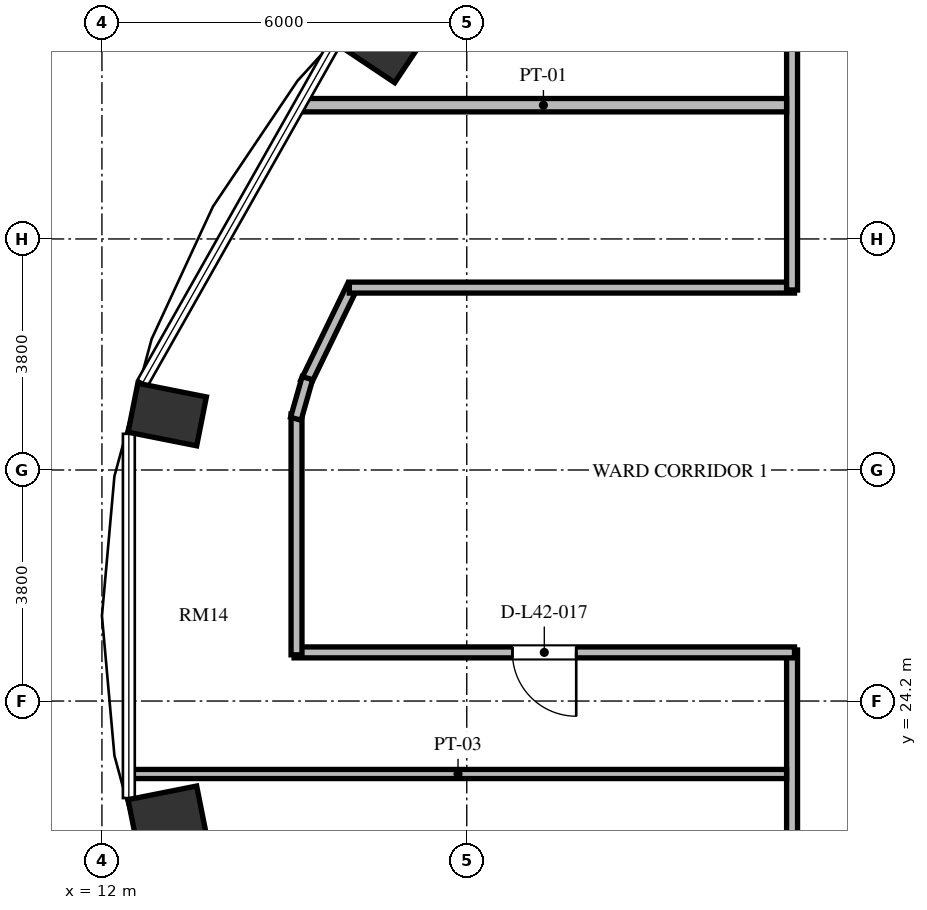
"""IFC4 building model, lengths in metres.
Left out: names, types, materials, properties, quantities, classifications, styles, units other than length and angle.
Written with IfcOpenShell. Run it as: python <this file> out.ifc"""

import sys

from ifc_helpers import new_model, si_unit, direction, frame, frame_2d, origin, origin_2d, place, context, subcontext, project, spatial, rectangle, extrude, element, fill, save


model = new_model("IFC4")
c1 = context("Model", 3, precision=1e-05, world=origin(), true_north=direction((0.0, 1.0)))
c2 = subcontext(c1, "Body", "Model", "MODEL_VIEW")
j1 = project(units=[si_unit("LENGTHUNIT", "METRE"), si_unit("PLANEANGLEUNIT", "RADIAN")], contexts=[c1])
p1 = place(None, origin())
s1 = spatial("IfcSite", under=j1, at=p1, CompositionType="ELEMENT")
p2 = place(p1, origin())
s2 = spatial("IfcBuilding", under=s1, at=p2, CompositionType="ELEMENT")
p3 = place(p2, frame((0.0, 0.0, 163.824)))
s3 = spatial("IfcBuildingStorey", under=s2, at=p3, CompositionType="ELEMENT", Elevation=163.824)
for number, where, z_axis, x_axis in (
    (1, (16.564, 35.031, 0.0), (0.0, 0.0, 1.0), (-0.831, 0.556, 0.0)),
    (2, (13.074, 28.912, 0.0), (0.0, 0.0, 1.0), (-0.981, 0.195, 0.0)),
    (3, (13.074, 22.288, 0.0), (0.0, 0.0, 1.0), (-0.981, -0.195, 0.0)),
):
    element("IfcColumn", number, at=place(p3, frame(where, z_axis=z_axis, x_axis=x_axis)), inside=s3, PredefinedType="COLUMN", context=c2, shape_type="SweptSolid", body=[
        extrude(rectangle(XDim=1.15, YDim=0.82, at=origin_2d()), origin(), (0.0, 0.0, 1.0), 3.648),
    ])
p4 = place(p3, frame((15.35, 29.436, 0.0), z_axis=(0.0, 0.0, 1.0), x_axis=(0.436196025907, 0.899851669434, 0.0)))
e4 = element("IfcWall", 4, at=p4, inside=s3, PredefinedType="PARTITIONING", context=c2, shape_type="SweptSolid", body=[
    extrude(rectangle(XDim=1.778, YDim=0.18, at=frame_2d((0.889, 0.0))), origin(), (0.0, 0.0, 1.0), 3.428),
])
p5 = place(p3, frame((16.068, 31.0, 0.0), z_axis=(0.0, 0.0, 1.0), x_axis=(1.0, 0.0, 0.0)))
e5 = element("IfcWall", 5, at=p5, inside=s3, PredefinedType="PARTITIONING", context=c2, shape_type="SweptSolid", body=[
    extrude(rectangle(XDim=7.322, YDim=0.18, at=frame_2d((3.661, 0.0))), origin(), (0.0, 0.0, 1.0), 3.428),
])
p6 = place(p3, frame((23.35, 30.96, 0.0), z_axis=(0.0, 0.0, 1.0), x_axis=(0.0, 1.0, 0.0)))
e6 = element("IfcWall", 6, at=p6, inside=s3, PredefinedType="PARTITIONING", context=c2, shape_type="SweptSolid", body=[
    extrude(rectangle(XDim=6.714, YDim=0.18, at=frame_2d((3.357, 0.0))), origin(), (0.0, 0.0, 1.0), 3.428),
])
p7 = place(p3, frame((23.35, 19.98, 0.0), z_axis=(0.0, 0.0, 1.0), x_axis=(0.0, 1.0, 0.0)))
e7 = element("IfcWall", 7, at=p7, inside=s3, PredefinedType="PARTITIONING", context=c2, shape_type="SweptSolid", body=[
    extrude(rectangle(XDim=5.06, YDim=0.18, at=frame_2d((2.53, 0.0))), origin(), (0.0, 0.0, 1.0), 3.428),
])
p8 = place(p3, frame((23.39, 25.0, 0.0), z_axis=(0.0, 0.0, 1.0), x_axis=(-1.0, 0.0, 0.0)))
e8 = element("IfcWall", 8, at=p8, inside=s3, PredefinedType="PARTITIONING", context=c2, shape_type="SweptSolid", body=[
    extrude(rectangle(XDim=8.23, YDim=0.18, at=frame_2d((4.115, 0.0))), origin(), (0.0, 0.0, 1.0), 3.428),
])
p9 = place(p8, frame((3.59, 0.0, 0.0)))
e9 = element("IfcOpeningElement", 9, at=p9, cuts=e8, PredefinedType="OPENING", context=c2, shape_type="SweptSolid", body=[
    extrude(rectangle(XDim=1.05, YDim=2.15, at=frame_2d((0.525, 1.075))), frame((0.0, 0.1, 0.0), z_axis=(0.0, -1.0, 0.0), x_axis=(1.0, 0.0, 0.0)), (0.0, 0.0, 1.0), 0.2),
])
p10 = place(p3, frame((15.2, 24.96, 0.0), z_axis=(0.0, 0.0, 1.0), x_axis=(0.0, 1.0, 0.0)))
e10 = element("IfcWall", 10, at=p10, inside=s3, PredefinedType="PARTITIONING", context=c2, shape_type="SweptSolid", body=[
    extrude(rectangle(XDim=3.961, YDim=0.18, at=frame_2d((1.98, 0.0))), origin(), (0.0, 0.0, 1.0), 3.428),
])
p11 = place(p3, frame((15.189, 28.843, 0.0), z_axis=(0.0, 0.0, 1.0), x_axis=(0.272862960331, 0.962052911684, 0.0)))
e11 = element("IfcWall", 11, at=p11, inside=s3, PredefinedType="PARTITIONING", context=c2, shape_type="SweptSolid", body=[
    extrude(rectangle(XDim=0.694, YDim=0.18, at=frame_2d((0.347, 0.0))), origin(), (0.0, 0.0, 1.0), 3.428),
])
p12 = place(p3, frame((12.453, 23.0, 0.0), z_axis=(0.0, 0.0, 1.0), x_axis=(1.0, 0.0, 0.0)))
e12 = element("IfcWall", 12, at=p12, inside=s3, PredefinedType="PARTITIONING", context=c2, shape_type="SweptSolid", body=[
    extrude(rectangle(XDim=10.807, YDim=0.15, at=frame_2d((5.404, 0.0))), origin(), (0.0, 0.0, 1.0), 3.428),
])
p13 = place(p3, frame((15.261, 34.0, 0.0), z_axis=(0.0, 0.0, 1.0), x_axis=(1.0, 0.0, 0.0)))
e13 = element("IfcWall", 13, at=p13, inside=s3, PredefinedType="PARTITIONING", context=c2, shape_type="SweptSolid", body=[
    extrude(rectangle(XDim=7.999, YDim=0.22, at=frame_2d((4.0, 0.0))), origin(), (0.0, 0.0, 1.0), 3.428),
])
p14 = place(p9, origin())
e14 = element("IfcDoor", 14, at=p14, inside=s3, OperationType="SINGLE_SWING_LEFT", PredefinedType="DOOR", context=c2, shape_type="SweptSolid", body=[
    extrude(rectangle(XDim=1.05, YDim=2.15, at=frame_2d((0.525, 1.075))), frame((0.0, 0.025, 0.0), z_axis=(0.0, -1.0, 0.0), x_axis=(1.0, 0.0, 0.0)), (0.0, 0.0, 1.0), 0.05),
])
fill(e9, e14)
save(model, sys.argv[1])
